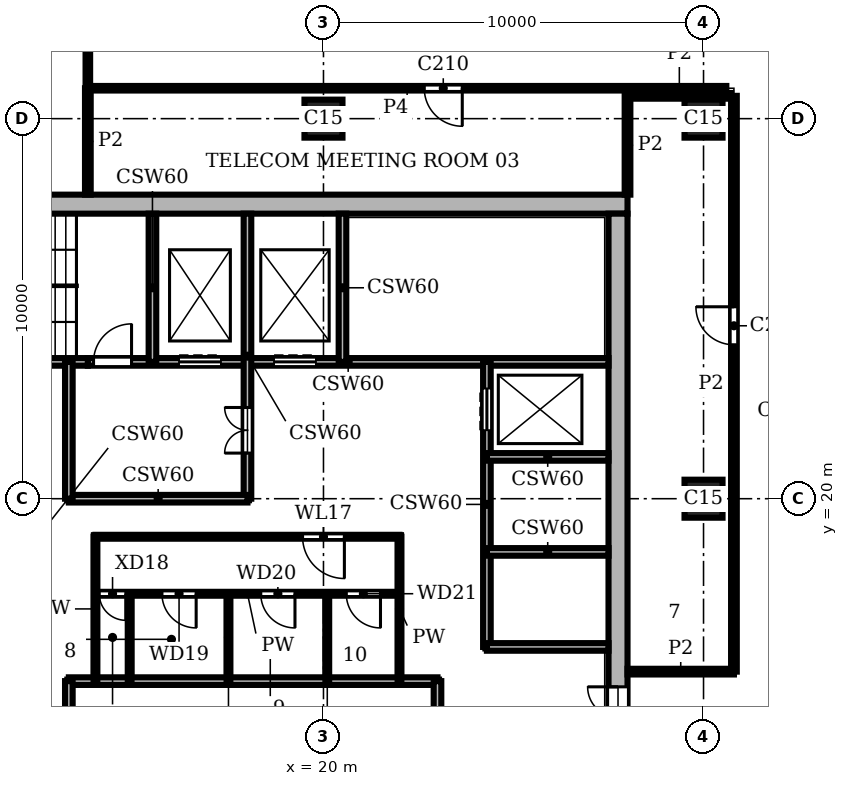
"""IFC4 building model, lengths in metres.
Left out: names, types, materials, properties, quantities, classifications, styles, units other than length and angle.
Written with IfcOpenShell. Run it as: python <this file> out.ifc"""

import sys

from ifc_helpers import new_model, si_unit, direction, frame, frame_2d, origin, origin_2d, place, context, subcontext, project, spatial, rectangle, extrude, element, fill, save


model = new_model("IFC4")
c1 = context("Model", 3, precision=1e-05, world=origin(), true_north=direction((0.0, 1.0)))
c2 = subcontext(c1, "Body", "Model", "MODEL_VIEW")
j1 = project(units=[si_unit("LENGTHUNIT", "METRE"), si_unit("PLANEANGLEUNIT", "RADIAN")], contexts=[c1])
p1 = place(None, origin())
s1 = spatial("IfcSite", under=j1, at=p1, CompositionType="ELEMENT")
p2 = place(p1, origin())
s2 = spatial("IfcBuilding", under=s1, at=p2, CompositionType="ELEMENT")
p3 = place(p2, frame((0.0, 0.0, 263.1)))
s3 = spatial("IfcBuildingStorey", under=s2, at=p3, CompositionType="ELEMENT", Elevation=263.1)
for number, where, z_axis, x_axis in (
    (1, (20.0, 30.0, 0.0), (0.0, 0.0, 1.0), (1.0, 0.0, 0.0)),
    (2, (30.0, 20.0, 0.0), (0.0, 0.0, 1.0), (1.0, 0.0, 0.0)),
    (3, (30.0, 30.0, 0.0), (0.0, 0.0, 1.0), (1.0, 0.0, 0.0)),
):
    element("IfcColumn", number, at=place(p3, frame(where, z_axis=z_axis, x_axis=x_axis)), inside=s3, PredefinedType="COLUMN", context=c2, shape_type="SweptSolid", body=[
        extrude(rectangle(XDim=1.0, YDim=1.0, at=origin_2d()), origin(), (0.0, 0.0, 1.0), 3.9),
    ])
p4 = place(p3, frame((27.75, 8.5, 0.0), z_axis=(0.0, 0.0, 1.0), x_axis=(0.0, 1.0, 0.0)))
e4 = element("IfcWall", 4, at=p4, inside=s3, PredefinedType="SHEAR", context=c2, shape_type="SweptSolid", body=[
    extrude(rectangle(XDim=19.0, YDim=0.5, at=frame_2d((9.5, 0.0))), origin(), (0.0, 0.0, 1.0), 3.9),
])
p5 = place(p4, frame((4.95, 0.0, 0.0)))
e5 = element("IfcOpeningElement", 5, at=p5, cuts=e4, PredefinedType="OPENING", context=c2, shape_type="SweptSolid", body=[
    extrude(rectangle(XDim=1.6, YDim=2.1, at=frame_2d((0.8, 1.05))), frame((0.0, 0.26, 0.0), z_axis=(0.0, -1.0, 0.0), x_axis=(1.0, 0.0, 0.0)), (0.0, 0.0, 1.0), 0.52),
])
p6 = place(p3, frame((28.0, 27.75, 0.0), z_axis=(0.0, 0.0, 1.0), x_axis=(-1.0, 0.0, 0.0)))
e6 = element("IfcWall", 6, at=p6, inside=s3, PredefinedType="SHEAR", context=c2, shape_type="SweptSolid", body=[
    extrude(rectangle(XDim=20.0, YDim=0.5, at=frame_2d((10.0, 0.0))), origin(), (0.0, 0.0, 1.0), 3.9),
])
p7 = place(p3, frame((13.3, 15.2, 0.0), z_axis=(0.0, 0.0, 1.0), x_axis=(1.0, 0.0, 0.0)))
e7 = element("IfcWall", 7, at=p7, inside=s3, PredefinedType="SHEAR", context=c2, shape_type="SweptSolid", body=[
    extrude(rectangle(XDim=9.7, YDim=0.2, at=frame_2d((4.85, 0.0))), origin(), (0.0, 0.0, 1.0), 3.58),
])
p8 = place(p3, frame((24.3, 16.1, 0.0), z_axis=(0.0, 0.0, 1.0), x_axis=(1.0, 0.0, 0.0)))
e8 = element("IfcWall", 8, at=p8, inside=s3, PredefinedType="SHEAR", context=c2, shape_type="SweptSolid", body=[
    extrude(rectangle(XDim=3.2, YDim=0.2, at=frame_2d((1.6, 0.0))), origin(), (0.0, 0.0, 1.0), 3.58),
])
p9 = place(p3, frame((14.0, 17.5, 0.0), z_axis=(0.0, 0.0, 1.0), x_axis=(1.0, 0.0, 0.0)))
e9 = element("IfcWall", 9, at=p9, inside=s3, PredefinedType="PARTITIONING", context=c2, shape_type="SweptSolid", body=[
    extrude(rectangle(XDim=8.0, YDim=0.1, at=frame_2d((4.0, 0.0))), origin(), (0.0, 0.0, 1.0), 3.58),
])
p10 = place(p9, frame((0.1, 0.0, 0.0)))
e10 = element("IfcOpeningElement", 10, at=p10, cuts=e9, PredefinedType="OPENING", context=c2, shape_type="SweptSolid", body=[
    extrude(rectangle(XDim=0.7, YDim=2.1, at=frame_2d((0.35, 1.05))), frame((0.0, 0.06, 0.0), z_axis=(0.0, -1.0, 0.0), x_axis=(1.0, 0.0, 0.0)), (0.0, 0.0, 1.0), 0.12),
])
p11 = place(p9, frame((1.75, 0.0, 0.0)))
e11 = element("IfcOpeningElement", 11, at=p11, cuts=e9, PredefinedType="OPENING", context=c2, shape_type="SweptSolid", body=[
    extrude(rectangle(XDim=0.9, YDim=2.1, at=frame_2d((0.45, 1.05))), frame((0.0, 0.06, 0.0), z_axis=(0.0, -1.0, 0.0), x_axis=(1.0, 0.0, 0.0)), (0.0, 0.0, 1.0), 0.12),
])
p12 = place(p9, frame((4.35, 0.0, 0.0)))
e12 = element("IfcOpeningElement", 12, at=p12, cuts=e9, PredefinedType="OPENING", context=c2, shape_type="SweptSolid", body=[
    extrude(rectangle(XDim=0.9, YDim=2.1, at=frame_2d((0.45, 1.05))), frame((0.0, 0.06, 0.0), z_axis=(0.0, -1.0, 0.0), x_axis=(1.0, 0.0, 0.0)), (0.0, 0.0, 1.0), 0.12),
])
p13 = place(p9, frame((6.6, 0.0, 0.0)))
e13 = element("IfcOpeningElement", 13, at=p13, cuts=e9, PredefinedType="OPENING", context=c2, shape_type="SweptSolid", body=[
    extrude(rectangle(XDim=0.9, YDim=2.1, at=frame_2d((0.45, 1.05))), frame((0.0, 0.06, 0.0), z_axis=(0.0, -1.0, 0.0), x_axis=(1.0, 0.0, 0.0)), (0.0, 0.0, 1.0), 0.12),
])
p14 = place(p3, frame((24.3, 18.6, 0.0), z_axis=(0.0, 0.0, 1.0), x_axis=(1.0, 0.0, 0.0)))
e14 = element("IfcWall", 14, at=p14, inside=s3, PredefinedType="SHEAR", context=c2, shape_type="SweptSolid", body=[
    extrude(rectangle(XDim=3.2, YDim=0.2, at=frame_2d((1.6, 0.0))), origin(), (0.0, 0.0, 1.0), 3.58),
])
p15 = place(p3, frame((14.0, 19.0, 0.0), z_axis=(0.0, 0.0, 1.0), x_axis=(1.0, 0.0, 0.0)))
e15 = element("IfcWall", 15, at=p15, inside=s3, PredefinedType="PARTITIONING", context=c2, shape_type="SweptSolid", body=[
    extrude(rectangle(XDim=8.0, YDim=0.1, at=frame_2d((4.0, 0.0))), origin(), (0.0, 0.0, 1.0), 3.58),
])
p16 = place(p15, frame((5.45, 0.0, 0.0)))
e16 = element("IfcOpeningElement", 16, at=p16, cuts=e15, PredefinedType="OPENING", context=c2, shape_type="SweptSolid", body=[
    extrude(rectangle(XDim=1.1, YDim=2.1, at=frame_2d((0.55, 1.05))), frame((0.0, 0.06, 0.0), z_axis=(0.0, -1.0, 0.0), x_axis=(1.0, 0.0, 0.0)), (0.0, 0.0, 1.0), 0.12),
])
p17 = place(p3, frame((13.3, 20.0, 0.0), z_axis=(0.0, 0.0, 1.0), x_axis=(1.0, 0.0, 0.0)))
e17 = element("IfcWall", 17, at=p17, inside=s3, PredefinedType="SHEAR", context=c2, shape_type="SweptSolid", body=[
    extrude(rectangle(XDim=4.7, YDim=0.2, at=frame_2d((2.35, 0.0))), origin(), (0.0, 0.0, 1.0), 3.58),
])
p18 = place(p3, frame((24.3, 21.1, 0.0), z_axis=(0.0, 0.0, 1.0), x_axis=(1.0, 0.0, 0.0)))
e18 = element("IfcWall", 18, at=p18, inside=s3, PredefinedType="SHEAR", context=c2, shape_type="SweptSolid", body=[
    extrude(rectangle(XDim=3.2, YDim=0.2, at=frame_2d((1.6, 0.0))), origin(), (0.0, 0.0, 1.0), 3.58),
])
p19 = place(p3, frame((8.5, 23.6, 0.0), z_axis=(0.0, 0.0, 1.0), x_axis=(1.0, 0.0, 0.0)))
e19 = element("IfcWall", 19, at=p19, inside=s3, PredefinedType="SHEAR", context=c2, shape_type="SweptSolid", body=[
    extrude(rectangle(XDim=5.3, YDim=0.2, at=frame_2d((2.65, 0.0))), origin(), (0.0, 0.0, 1.0), 3.58),
])
p20 = place(p3, frame((13.8, 23.6, 0.0), z_axis=(0.0, 0.0, 1.0), x_axis=(1.0, 0.0, 0.0)))
e20 = element("IfcWall", 20, at=p20, inside=s3, PredefinedType="SHEAR", context=c2, shape_type="SweptSolid", body=[
    extrude(rectangle(XDim=13.7, YDim=0.2, at=frame_2d((6.85, 0.0))), origin(), (0.0, 0.0, 1.0), 3.58),
])
p21 = place(p20, frame((2.4, 0.0, 0.0)))
e21 = element("IfcOpeningElement", 21, at=p21, cuts=e20, PredefinedType="OPENING", context=c2, shape_type="SweptSolid", body=[
    extrude(rectangle(XDim=1.1, YDim=2.1, at=frame_2d((0.55, 1.05))), frame((0.0, 0.11, 0.0), z_axis=(0.0, -1.0, 0.0), x_axis=(1.0, 0.0, 0.0)), (0.0, 0.0, 1.0), 0.22),
])
p22 = place(p20, frame((4.9, 0.0, 0.0)))
e22 = element("IfcOpeningElement", 22, at=p22, cuts=e20, PredefinedType="OPENING", context=c2, shape_type="SweptSolid", body=[
    extrude(rectangle(XDim=1.1, YDim=2.1, at=frame_2d((0.55, 1.05))), frame((0.0, 0.11, 0.0), z_axis=(0.0, -1.0, 0.0), x_axis=(1.0, 0.0, 0.0)), (0.0, 0.0, 1.0), 0.22),
])
p23 = place(p20, frame((0.15, 0.0, 0.0)))
e23 = element("IfcOpeningElement", 23, at=p23, cuts=e20, PredefinedType="OPENING", context=c2, shape_type="SweptSolid", body=[
    extrude(rectangle(XDim=1.0, YDim=2.1, at=frame_2d((0.5, 1.05))), frame((0.0, 0.11, 0.0), z_axis=(0.0, -1.0, 0.0), x_axis=(1.0, 0.0, 0.0)), (0.0, 0.0, 1.0), 0.22),
])
p24 = place(p3, frame((13.3, 12.4, 0.0), z_axis=(0.0, 0.0, 1.0), x_axis=(0.0, 1.0, 0.0)))
e24 = element("IfcWall", 24, at=p24, inside=s3, PredefinedType="SHEAR", context=c2, shape_type="SweptSolid", body=[
    extrude(rectangle(XDim=2.8, YDim=0.2, at=frame_2d((1.4, 0.0))), origin(), (0.0, 0.0, 1.0), 3.58),
])
p25 = place(p3, frame((13.3, 20.0, 0.0), z_axis=(0.0, 0.0, 1.0), x_axis=(0.0, 1.0, 0.0)))
e25 = element("IfcWall", 25, at=p25, inside=s3, PredefinedType="SHEAR", context=c2, shape_type="SweptSolid", body=[
    extrude(rectangle(XDim=3.6, YDim=0.2, at=frame_2d((1.8, 0.0))), origin(), (0.0, 0.0, 1.0), 3.58),
])
p26 = place(p3, frame((14.0, 15.2, 0.0), z_axis=(0.0, 0.0, 1.0), x_axis=(0.0, 1.0, 0.0)))
e26 = element("IfcWall", 26, at=p26, inside=s3, PredefinedType="PARTITIONING", context=c2, shape_type="SweptSolid", body=[
    extrude(rectangle(XDim=3.8, YDim=0.1, at=frame_2d((1.9, 0.0))), origin(), (0.0, 0.0, 1.0), 3.58),
])
p27 = place(p3, frame((14.9, 15.2, 0.0), z_axis=(0.0, 0.0, 1.0), x_axis=(0.0, 1.0, 0.0)))
e27 = element("IfcWall", 27, at=p27, inside=s3, PredefinedType="PARTITIONING", context=c2, shape_type="SweptSolid", body=[
    extrude(rectangle(XDim=2.3, YDim=0.1, at=frame_2d((1.15, 0.0))), origin(), (0.0, 0.0, 1.0), 3.58),
])
p28 = place(p3, frame((15.5, 23.6, 0.0), z_axis=(0.0, 0.0, 1.0), x_axis=(0.0, 1.0, 0.0)))
e28 = element("IfcWall", 28, at=p28, inside=s3, PredefinedType="SHEAR", context=c2, shape_type="SweptSolid", body=[
    extrude(rectangle(XDim=3.9, YDim=0.2, at=frame_2d((1.95, 0.0))), origin(), (0.0, 0.0, 1.0), 3.58),
])
p29 = place(p3, frame((17.5, 15.2, 0.0), z_axis=(0.0, 0.0, 1.0), x_axis=(0.0, 1.0, 0.0)))
e29 = element("IfcWall", 29, at=p29, inside=s3, PredefinedType="PARTITIONING", context=c2, shape_type="SweptSolid", body=[
    extrude(rectangle(XDim=2.3, YDim=0.1, at=frame_2d((1.15, 0.0))), origin(), (0.0, 0.0, 1.0), 3.58),
])
p30 = place(p3, frame((18.0, 20.0, 0.0), z_axis=(0.0, 0.0, 1.0), x_axis=(0.0, 1.0, 0.0)))
e30 = element("IfcWall", 30, at=p30, inside=s3, PredefinedType="SHEAR", context=c2, shape_type="SweptSolid", body=[
    extrude(rectangle(XDim=7.5, YDim=0.2, at=frame_2d((3.75, 0.0))), origin(), (0.0, 0.0, 1.0), 3.58),
])
p31 = place(p30, frame((1.2, 0.0, 0.0)))
e31 = element("IfcOpeningElement", 31, at=p31, cuts=e30, PredefinedType="OPENING", context=c2, shape_type="SweptSolid", body=[
    extrude(rectangle(XDim=1.2, YDim=2.1, at=frame_2d((0.6, 1.05))), frame((0.0, 0.11, 0.0), z_axis=(0.0, -1.0, 0.0), x_axis=(1.0, 0.0, 0.0)), (0.0, 0.0, 1.0), 0.22),
])
p32 = place(p3, frame((20.1, 15.2, 0.0), z_axis=(0.0, 0.0, 1.0), x_axis=(0.0, 1.0, 0.0)))
e32 = element("IfcWall", 32, at=p32, inside=s3, PredefinedType="PARTITIONING", context=c2, shape_type="SweptSolid", body=[
    extrude(rectangle(XDim=2.3, YDim=0.1, at=frame_2d((1.15, 0.0))), origin(), (0.0, 0.0, 1.0), 3.58),
])
p33 = place(p3, frame((20.5, 23.6, 0.0), z_axis=(0.0, 0.0, 1.0), x_axis=(0.0, 1.0, 0.0)))
e33 = element("IfcWall", 33, at=p33, inside=s3, PredefinedType="SHEAR", context=c2, shape_type="SweptSolid", body=[
    extrude(rectangle(XDim=3.9, YDim=0.2, at=frame_2d((1.95, 0.0))), origin(), (0.0, 0.0, 1.0), 3.58),
])
p34 = place(p3, frame((22.0, 15.2, 0.0), z_axis=(0.0, 0.0, 1.0), x_axis=(0.0, 1.0, 0.0)))
e34 = element("IfcWall", 34, at=p34, inside=s3, PredefinedType="PARTITIONING", context=c2, shape_type="SweptSolid", body=[
    extrude(rectangle(XDim=3.8, YDim=0.1, at=frame_2d((1.9, 0.0))), origin(), (0.0, 0.0, 1.0), 3.58),
])
p35 = place(p3, frame((23.0, 12.4, 0.0), z_axis=(0.0, 0.0, 1.0), x_axis=(0.0, 1.0, 0.0)))
e35 = element("IfcWall", 35, at=p35, inside=s3, PredefinedType="SHEAR", context=c2, shape_type="SweptSolid", body=[
    extrude(rectangle(XDim=2.8, YDim=0.2, at=frame_2d((1.4, 0.0))), origin(), (0.0, 0.0, 1.0), 3.58),
])
p36 = place(p35, frame((0.8, 0.0, 0.0)))
e36 = element("IfcOpeningElement", 36, at=p36, cuts=e35, PredefinedType="OPENING", context=c2, shape_type="SweptSolid", body=[
    extrude(rectangle(XDim=1.2, YDim=2.1, at=frame_2d((0.6, 1.05))), frame((0.0, 0.11, 0.0), z_axis=(0.0, -1.0, 0.0), x_axis=(1.0, 0.0, 0.0)), (0.0, 0.0, 1.0), 0.22),
])
p37 = place(p3, frame((24.3, 16.1, 0.0), z_axis=(0.0, 0.0, 1.0), x_axis=(0.0, 1.0, 0.0)))
e37 = element("IfcWall", 37, at=p37, inside=s3, PredefinedType="SHEAR", context=c2, shape_type="SweptSolid", body=[
    extrude(rectangle(XDim=7.5, YDim=0.2, at=frame_2d((3.75, 0.0))), origin(), (0.0, 0.0, 1.0), 3.58),
])
p38 = place(p37, frame((5.7, 0.0, 0.0)))
e38 = element("IfcOpeningElement", 38, at=p38, cuts=e37, PredefinedType="OPENING", context=c2, shape_type="SweptSolid", body=[
    extrude(rectangle(XDim=1.1, YDim=2.1, at=frame_2d((0.55, 1.05))), frame((0.0, 0.11, 0.0), z_axis=(0.0, -1.0, 0.0), x_axis=(1.0, 0.0, 0.0)), (0.0, 0.0, 1.0), 0.22),
])
p39 = place(p3, frame((13.8, 28.0, 0.0), z_axis=(0.0, 0.0, 1.0), x_axis=(0.0, 1.0, 0.0)))
e39 = element("IfcWall", 39, at=p39, inside=s3, PredefinedType="PARTITIONING", context=c2, shape_type="SweptSolid", body=[
    extrude(rectangle(XDim=2.8, YDim=0.15, at=frame_2d((1.4, 0.0))), origin(), (0.0, 0.0, 1.0), 3.58),
])
p40 = place(p3, frame((28.0, 28.0, 0.0), z_axis=(0.0, 0.0, 1.0), x_axis=(0.0, 1.0, 0.0)))
e40 = element("IfcWall", 40, at=p40, inside=s3, PredefinedType="PARTITIONING", context=c2, shape_type="SweptSolid", body=[
    extrude(rectangle(XDim=2.598, YDim=0.15, at=frame_2d((1.299, 0.0))), origin(), (0.0, 0.0, 1.0), 3.58),
])
p41 = place(p3, frame((30.8, 15.45, 0.0), z_axis=(0.0, 0.0, 1.0), x_axis=(0.0, 1.0, 0.0)))
e41 = element("IfcWall", 41, at=p41, inside=s3, PredefinedType="PARTITIONING", context=c2, shape_type="SweptSolid", body=[
    extrude(rectangle(XDim=15.15, YDim=0.15, at=frame_2d((7.575, 0.0))), origin(), (0.0, 0.0, 1.0), 3.58),
])
p42 = place(p41, frame((8.6, 0.0, 0.0)))
e42 = element("IfcOpeningElement", 42, at=p42, cuts=e41, PredefinedType="OPENING", context=c2, shape_type="SweptSolid", body=[
    extrude(rectangle(XDim=1.0, YDim=2.1, at=frame_2d((0.5, 1.05))), frame((0.0, 0.085, 0.0), z_axis=(0.0, -1.0, 0.0), x_axis=(1.0, 0.0, 0.0)), (0.0, 0.0, 1.0), 0.17),
])
p43 = place(p3, frame((28.0, 15.45, 0.0), z_axis=(0.0, 0.0, 1.0), x_axis=(1.0, 0.0, 0.0)))
e43 = element("IfcWall", 43, at=p43, inside=s3, PredefinedType="PARTITIONING", context=c2, shape_type="SweptSolid", body=[
    extrude(rectangle(XDim=2.8, YDim=0.15, at=frame_2d((1.4, 0.0))), origin(), (0.0, 0.0, 1.0), 3.58),
])
p44 = place(p3, frame((28.002, 30.6, 0.0), z_axis=(0.0, 0.0, 1.0), x_axis=(1.0, 0.0, 0.0)))
e44 = element("IfcWall", 44, at=p44, inside=s3, PredefinedType="PARTITIONING", context=c2, shape_type="SweptSolid", body=[
    extrude(rectangle(XDim=2.723, YDim=0.15, at=frame_2d((1.362, 0.0))), origin(), (0.0, 0.0, 1.0), 3.58),
])
p45 = place(p3, frame((13.8, 30.8, 0.0), z_axis=(0.0, 0.0, 1.0), x_axis=(0.0, 1.0, 0.0)))
e45 = element("IfcWall", 45, at=p45, inside=s3, PredefinedType="PARTITIONING", context=c2, shape_type="SweptSolid", body=[
    extrude(rectangle(XDim=11.7, YDim=0.12, at=frame_2d((5.85, 0.0))), origin(), (0.0, 0.0, 1.0), 3.58),
])
p46 = place(p45, frame((4.85, 0.0, 0.0)))
e46 = element("IfcOpeningElement", 46, at=p46, cuts=e45, PredefinedType="OPENING", context=c2, shape_type="SweptSolid", body=[
    extrude(rectangle(XDim=1.0, YDim=2.1, at=frame_2d((0.5, 1.05))), frame((0.0, 0.07, 0.0), z_axis=(0.0, -1.0, 0.0), x_axis=(1.0, 0.0, 0.0)), (0.0, 0.0, 1.0), 0.14),
])
p47 = place(p3, frame((13.802, 30.8, 0.0), z_axis=(0.0, 0.0, 1.0), x_axis=(1.0, 0.0, 0.0)))
e47 = element("IfcWall", 47, at=p47, inside=s3, PredefinedType="PARTITIONING", context=c2, shape_type="SweptSolid", body=[
    extrude(rectangle(XDim=16.798, YDim=0.12, at=frame_2d((8.399, 0.0))), origin(), (0.0, 0.0, 1.0), 3.58),
])
p48 = place(p47, frame((8.85, 0.0, 0.0)))
e48 = element("IfcOpeningElement", 48, at=p48, cuts=e47, PredefinedType="OPENING", context=c2, shape_type="SweptSolid", body=[
    extrude(rectangle(XDim=1.0, YDim=2.1, at=frame_2d((0.5, 1.05))), frame((0.0, 0.07, 0.0), z_axis=(0.0, -1.0, 0.0), x_axis=(1.0, 0.0, 0.0)), (0.0, 0.0, 1.0), 0.14),
])
p49 = place(p38, origin())
e49 = element("IfcDoor", 49, at=p49, inside=s3, OperationType="DOUBLE_DOOR_SLIDING", PredefinedType="DOOR", context=c2, shape_type="SweptSolid", body=[
    extrude(rectangle(XDim=1.1, YDim=2.1, at=frame_2d((0.55, 1.05))), frame((0.0, 0.025, 0.0), z_axis=(0.0, -1.0, 0.0), x_axis=(1.0, 0.0, 0.0)), (0.0, 0.0, 1.0), 0.05),
])
fill(e38, e49)
p50 = place(p21, origin())
e50 = element("IfcDoor", 50, at=p50, inside=s3, OperationType="DOUBLE_DOOR_SLIDING", PredefinedType="DOOR", context=c2, shape_type="SweptSolid", body=[
    extrude(rectangle(XDim=1.1, YDim=2.1, at=frame_2d((0.55, 1.05))), frame((0.0, 0.025, 0.0), z_axis=(0.0, -1.0, 0.0), x_axis=(1.0, 0.0, 0.0)), (0.0, 0.0, 1.0), 0.05),
])
fill(e21, e50)
p51 = place(p22, origin())
e51 = element("IfcDoor", 51, at=p51, inside=s3, OperationType="DOUBLE_DOOR_SLIDING", PredefinedType="DOOR", context=c2, shape_type="SweptSolid", body=[
    extrude(rectangle(XDim=1.1, YDim=2.1, at=frame_2d((0.55, 1.05))), frame((0.0, 0.025, 0.0), z_axis=(0.0, -1.0, 0.0), x_axis=(1.0, 0.0, 0.0)), (0.0, 0.0, 1.0), 0.05),
])
fill(e22, e51)
p52 = place(p23, origin())
e52 = element("IfcDoor", 52, at=p52, inside=s3, OperationType="SINGLE_SWING_RIGHT", PredefinedType="DOOR", context=c2, shape_type="SweptSolid", body=[
    extrude(rectangle(XDim=1.0, YDim=2.1, at=frame_2d((0.5, 1.05))), frame((0.0, 0.025, 0.0), z_axis=(0.0, -1.0, 0.0), x_axis=(1.0, 0.0, 0.0)), (0.0, 0.0, 1.0), 0.05),
])
fill(e23, e52)
p53 = place(p31, origin())
e53 = element("IfcDoor", 53, at=p53, inside=s3, OperationType="DOUBLE_DOOR_SINGLE_SWING", PredefinedType="DOOR", context=c2, shape_type="SweptSolid", body=[
    extrude(rectangle(XDim=1.2, YDim=2.1, at=frame_2d((0.6, 1.05))), frame((0.0, 0.025, 0.0), z_axis=(0.0, -1.0, 0.0), x_axis=(1.0, 0.0, 0.0)), (0.0, 0.0, 1.0), 0.05),
])
fill(e31, e53)
p54 = place(p16, frame((1.1, 0.0, 0.0), z_axis=(0.0, 0.0, 1.0), x_axis=(-1.0, 0.0, 0.0)))
e54 = element("IfcDoor", 54, at=p54, inside=s3, OperationType="SINGLE_SWING_LEFT", PredefinedType="DOOR", context=c2, shape_type="SweptSolid", body=[
    extrude(rectangle(XDim=1.1, YDim=2.1, at=frame_2d((0.55, 1.05))), frame((0.0, 0.025, 0.0), z_axis=(0.0, -1.0, 0.0), x_axis=(1.0, 0.0, 0.0)), (0.0, 0.0, 1.0), 0.05),
])
fill(e16, e54)
p55 = place(p10, frame((0.7, 0.0, 0.0), z_axis=(0.0, 0.0, 1.0), x_axis=(-1.0, 0.0, 0.0)))
e55 = element("IfcDoor", 55, at=p55, inside=s3, OperationType="SINGLE_SWING_LEFT", PredefinedType="DOOR", context=c2, shape_type="SweptSolid", body=[
    extrude(rectangle(XDim=0.7, YDim=2.1, at=frame_2d((0.35, 1.05))), frame((0.0, 0.025, 0.0), z_axis=(0.0, -1.0, 0.0), x_axis=(1.0, 0.0, 0.0)), (0.0, 0.0, 1.0), 0.05),
])
fill(e10, e55)
p56 = place(p11, frame((0.9, 0.0, 0.0), z_axis=(0.0, 0.0, 1.0), x_axis=(-1.0, 0.0, 0.0)))
e56 = element("IfcDoor", 56, at=p56, inside=s3, OperationType="SINGLE_SWING_LEFT", PredefinedType="DOOR", context=c2, shape_type="SweptSolid", body=[
    extrude(rectangle(XDim=0.9, YDim=2.1, at=frame_2d((0.45, 1.05))), frame((0.0, 0.025, 0.0), z_axis=(0.0, -1.0, 0.0), x_axis=(1.0, 0.0, 0.0)), (0.0, 0.0, 1.0), 0.05),
])
fill(e11, e56)
p57 = place(p12, frame((0.9, 0.0, 0.0), z_axis=(0.0, 0.0, 1.0), x_axis=(-1.0, 0.0, 0.0)))
e57 = element("IfcDoor", 57, at=p57, inside=s3, OperationType="SINGLE_SWING_LEFT", PredefinedType="DOOR", context=c2, shape_type="SweptSolid", body=[
    extrude(rectangle(XDim=0.9, YDim=2.1, at=frame_2d((0.45, 1.05))), frame((0.0, 0.025, 0.0), z_axis=(0.0, -1.0, 0.0), x_axis=(1.0, 0.0, 0.0)), (0.0, 0.0, 1.0), 0.05),
])
fill(e12, e57)
p58 = place(p13, frame((0.9, 0.0, 0.0), z_axis=(0.0, 0.0, 1.0), x_axis=(-1.0, 0.0, 0.0)))
e58 = element("IfcDoor", 58, at=p58, inside=s3, OperationType="SINGLE_SWING_LEFT", PredefinedType="DOOR", context=c2, shape_type="SweptSolid", body=[
    extrude(rectangle(XDim=0.9, YDim=2.1, at=frame_2d((0.45, 1.05))), frame((0.0, 0.025, 0.0), z_axis=(0.0, -1.0, 0.0), x_axis=(1.0, 0.0, 0.0)), (0.0, 0.0, 1.0), 0.05),
])
fill(e13, e58)
p59 = place(p5, origin())
e59 = element("IfcDoor", 59, at=p59, inside=s3, OperationType="DOUBLE_DOOR_SINGLE_SWING", PredefinedType="DOOR", context=c2, shape_type="SweptSolid", body=[
    extrude(rectangle(XDim=1.6, YDim=2.1, at=frame_2d((0.8, 1.05))), frame((0.0, 0.025, 0.0), z_axis=(0.0, -1.0, 0.0), x_axis=(1.0, 0.0, 0.0)), (0.0, 0.0, 1.0), 0.05),
])
fill(e5, e59)
p60 = place(p48, frame((1.0, 0.0, 0.0), z_axis=(0.0, 0.0, 1.0), x_axis=(-1.0, 0.0, 0.0)))
e60 = element("IfcDoor", 60, at=p60, inside=s3, OperationType="SINGLE_SWING_LEFT", PredefinedType="DOOR", context=c2, shape_type="SweptSolid", body=[
    extrude(rectangle(XDim=1.0, YDim=2.1, at=frame_2d((0.5, 1.05))), frame((0.0, 0.025, 0.0), z_axis=(0.0, -1.0, 0.0), x_axis=(1.0, 0.0, 0.0)), (0.0, 0.0, 1.0), 0.05),
])
fill(e48, e60)
p61 = place(p42, origin())
e61 = element("IfcDoor", 61, at=p61, inside=s3, OperationType="SINGLE_SWING_RIGHT", PredefinedType="DOOR", context=c2, shape_type="SweptSolid", body=[
    extrude(rectangle(XDim=1.0, YDim=2.1, at=frame_2d((0.5, 1.05))), frame((0.0, 0.025, 0.0), z_axis=(0.0, -1.0, 0.0), x_axis=(1.0, 0.0, 0.0)), (0.0, 0.0, 1.0), 0.05),
])
fill(e42, e61)
save(model, sys.argv[1])
